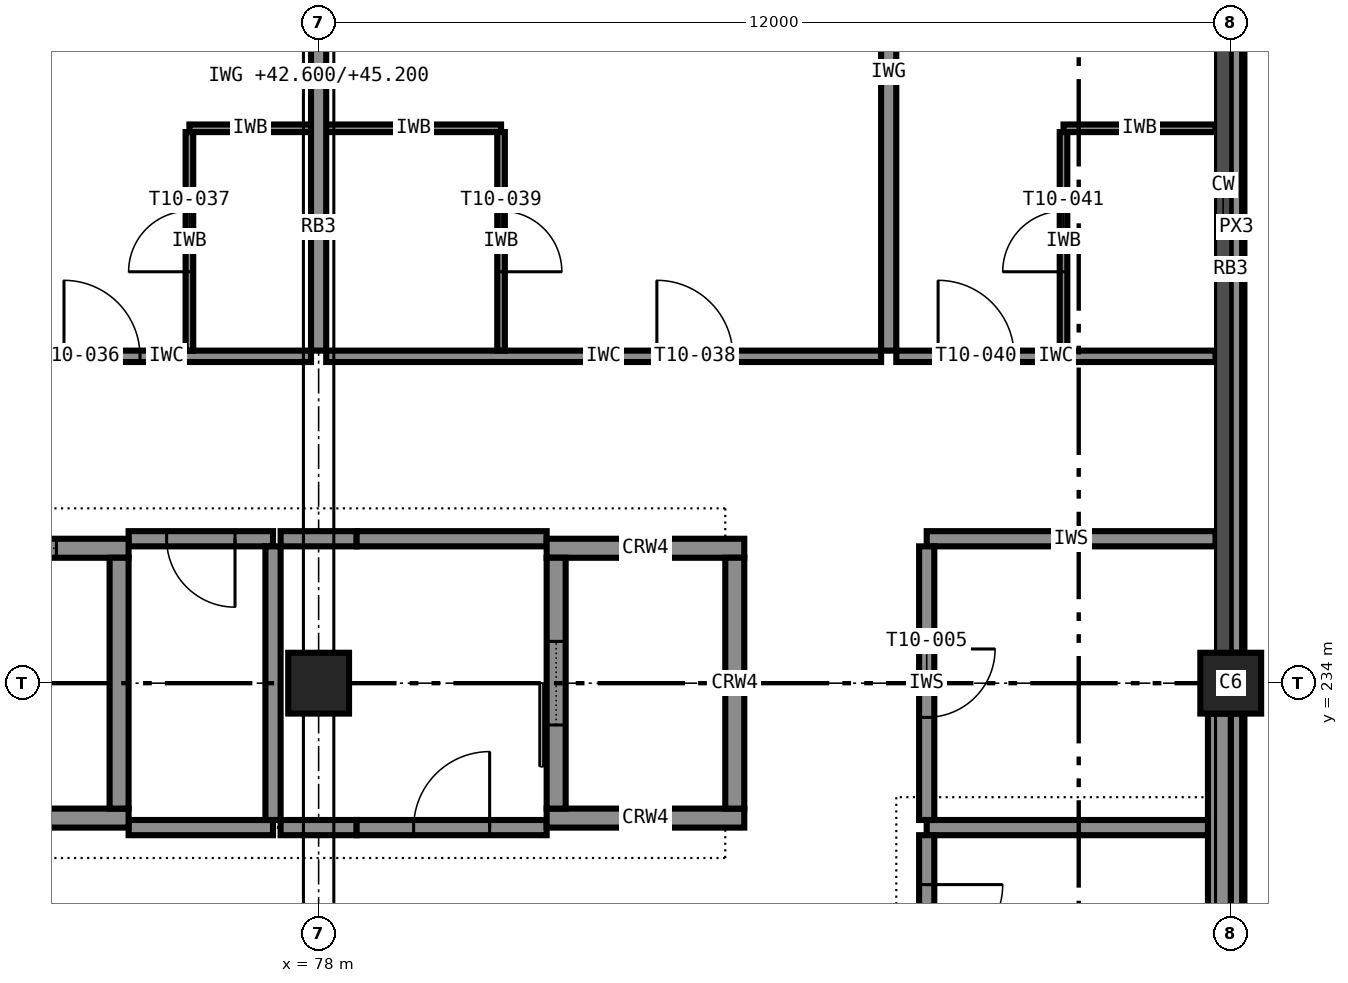
"""IFC4 building model, lengths in metres.
Left out: names, types, materials, properties, quantities, classifications, styles, units other than length and angle.
Written with IfcOpenShell. Run it as: python <this file> out.ifc"""

import sys

from ifc_helpers import new_model, si_unit, direction, frame, frame_2d, origin, origin_2d, place, context, subcontext, project, spatial, rectangle, extrude, element, fill, save


model = new_model("IFC4")
c1 = context("Model", 3, precision=1e-05, world=origin(), true_north=direction((0.0, 1.0)))
c2 = subcontext(c1, "Body", "Model", "MODEL_VIEW")
j1 = project(units=[si_unit("LENGTHUNIT", "METRE"), si_unit("PLANEANGLEUNIT", "RADIAN")], contexts=[c1])
p1 = place(None, origin())
s1 = spatial("IfcSite", under=j1, at=p1, CompositionType="ELEMENT")
p2 = place(p1, origin())
s2 = spatial("IfcBuilding", under=s1, at=p2, CompositionType="ELEMENT")
p3 = place(p2, frame((0.0, 0.0, 42.6)))
s3 = spatial("IfcBuildingStorey", under=s2, at=p3, CompositionType="ELEMENT", Elevation=42.6)
for number, where, z_axis, x_axis in (
    (1, (78.0, 234.0, 0.0), (0.0, 0.0, 1.0), (1.0, 0.0, 0.0)),
    (2, (90.0, 234.0, 0.0), (0.0, 0.0, 1.0), (1.0, 0.0, 0.0)),
):
    element("IfcColumn", number, at=place(p3, frame(where, z_axis=z_axis, x_axis=x_axis)), inside=s3, PredefinedType="COLUMN", context=c2, shape_type="SweptSolid", body=[
        extrude(rectangle(XDim=0.8, YDim=0.8, at=origin_2d()), origin(), (0.0, 0.0, 1.0), 3.6),
    ])
p4 = place(p3, frame((72.5, 232.225, 0.0), z_axis=(0.0, 0.0, 1.0), x_axis=(1.0, 0.0, 0.0)))
e3 = element("IfcWall", 3, at=p4, inside=s3, PredefinedType="SHEAR", context=c2, shape_type="SweptSolid", body=[
    extrude(rectangle(XDim=3.0, YDim=0.25, at=frame_2d((1.5, 0.0))), origin(), (0.0, 0.0, 1.0), 3.6),
])
p5 = place(p3, frame((72.5, 235.775, 0.0), z_axis=(0.0, 0.0, 1.0), x_axis=(1.0, 0.0, 0.0)))
e4 = element("IfcWall", 4, at=p5, inside=s3, PredefinedType="SHEAR", context=c2, shape_type="SweptSolid", body=[
    extrude(rectangle(XDim=3.0, YDim=0.25, at=frame_2d((1.5, 0.0))), origin(), (0.0, 0.0, 1.0), 3.6),
])
p6 = place(p5, frame((0.95, 0.0, 0.0)))
e5 = element("IfcOpeningElement", 5, at=p6, cuts=e4, PredefinedType="OPENING", context=c2, shape_type="SweptSolid", body=[
    extrude(rectangle(XDim=1.1, YDim=2.1, at=frame_2d((0.55, 1.05))), frame((0.0, 0.135, 0.0), z_axis=(0.0, -1.0, 0.0), x_axis=(1.0, 0.0, 0.0)), (0.0, 0.0, 1.0), 0.27),
])
p7 = place(p3, frame((75.375, 232.35, 0.0), z_axis=(0.0, 0.0, 1.0), x_axis=(0.0, 1.0, 0.0)))
e6 = element("IfcWall", 6, at=p7, inside=s3, PredefinedType="SHEAR", context=c2, shape_type="SweptSolid", body=[
    extrude(rectangle(XDim=3.3, YDim=0.25, at=frame_2d((1.65, 0.0))), origin(), (0.0, 0.0, 1.0), 3.6),
])
for number, where, z_axis, x_axis in (
    (7, (81.0, 232.225, 0.0), (0.0, 0.0, 1.0), (1.0, 0.0, 0.0)),
    (8, (81.0, 235.775, 0.0), (0.0, 0.0, 1.0), (1.0, 0.0, 0.0)),
):
    element("IfcWall", number, at=place(p3, frame(where, z_axis=z_axis, x_axis=x_axis)), inside=s3, PredefinedType="SHEAR", context=c2, shape_type="SweptSolid", body=[
        extrude(rectangle(XDim=2.6, YDim=0.25, at=frame_2d((1.3, 0.0))), origin(), (0.0, 0.0, 1.0), 3.6),
    ])
p8 = place(p3, frame((81.125, 232.35, 0.0), z_axis=(0.0, 0.0, 1.0), x_axis=(0.0, 1.0, 0.0)))
e9 = element("IfcWall", 9, at=p8, inside=s3, PredefinedType="SHEAR", context=c2, shape_type="SweptSolid", body=[
    extrude(rectangle(XDim=3.3, YDim=0.25, at=frame_2d((1.65, 0.0))), origin(), (0.0, 0.0, 1.0), 3.6),
])
p9 = place(p8, frame((1.1, 0.0, 0.0)))
e10 = element("IfcOpeningElement", 10, at=p9, cuts=e9, PredefinedType="OPENING", context=c2, shape_type="SweptSolid", body=[
    extrude(rectangle(XDim=1.1, YDim=2.1, at=frame_2d((0.55, 1.05))), frame((0.0, 0.135, 0.0), z_axis=(0.0, -1.0, 0.0), x_axis=(1.0, 0.0, 0.0)), (0.0, 0.0, 1.0), 0.27),
])
p10 = place(p3, frame((83.475, 232.35, 0.0), z_axis=(0.0, 0.0, 1.0), x_axis=(0.0, 1.0, 0.0)))
e11 = element("IfcWall", 11, at=p10, inside=s3, PredefinedType="SHEAR", context=c2, shape_type="SweptSolid", body=[
    extrude(rectangle(XDim=3.3, YDim=0.25, at=frame_2d((1.65, 0.0))), origin(), (0.0, 0.0, 1.0), 3.6),
])
p11 = place(p3, frame((89.85, 222.4, 0.0), z_axis=(0.0, 0.0, 1.0), x_axis=(0.0, 1.0, 0.0)))
e12 = element("IfcWall", 12, at=p11, inside=s3, PredefinedType="STANDARD", context=c2, shape_type="SweptSolid", body=[
    extrude(rectangle(XDim=11.2, YDim=0.3, at=frame_2d((5.6, 0.0))), origin(), (0.0, 0.0, 1.0), 2.6),
])
for number, where, z_axis, x_axis in (
    (13, (90.075, 222.4, 3.4), (0.0, 0.0, 1.0), (0.0, 1.0, 0.0)),
    (14, (90.075, 234.4, 3.4), (0.0, 0.0, 1.0), (0.0, 1.0, 0.0)),
):
    element("IfcWall", number, at=place(p3, frame(where, z_axis=z_axis, x_axis=x_axis)), inside=s3, PredefinedType="STANDARD", context=c2, shape_type="SweptSolid", body=[
        extrude(rectangle(XDim=11.2, YDim=0.15, at=frame_2d((5.6, 0.0))), origin(), (0.0, 0.0, 1.0), 0.2),
    ])
p12 = place(p3, frame((75.5, 232.1, 0.0), z_axis=(0.0, 0.0, 1.0), x_axis=(1.0, 0.0, 0.0)))
e15 = element("IfcWall", 15, at=p12, inside=s3, PredefinedType="PARTITIONING", context=c2, shape_type="SweptSolid", body=[
    extrude(rectangle(XDim=1.9, YDim=0.2, at=frame_2d((0.95, 0.0))), origin(), (0.0, 0.0, 1.0), 3.4),
])
p13 = place(p3, frame((77.5, 232.1, 0.0), z_axis=(0.0, 0.0, 1.0), x_axis=(1.0, 0.0, 0.0)))
e16 = element("IfcWall", 16, at=p13, inside=s3, PredefinedType="PARTITIONING", context=c2, shape_type="SweptSolid", body=[
    extrude(rectangle(XDim=1.0, YDim=0.2, at=frame_2d((0.5, 0.0))), origin(), (0.0, 0.0, 1.0), 3.4),
])
p14 = place(p3, frame((78.5, 232.1, 0.0), z_axis=(0.0, 0.0, 1.0), x_axis=(1.0, 0.0, 0.0)))
e17 = element("IfcWall", 17, at=p14, inside=s3, PredefinedType="PARTITIONING", context=c2, shape_type="SweptSolid", body=[
    extrude(rectangle(XDim=2.5, YDim=0.2, at=frame_2d((1.25, 0.0))), origin(), (0.0, 0.0, 1.0), 3.4),
])
p15 = place(p14, frame((0.75, 0.0, 0.0)))
e18 = element("IfcOpeningElement", 18, at=p15, cuts=e17, PredefinedType="OPENING", context=c2, shape_type="SweptSolid", body=[
    extrude(rectangle(XDim=1.0, YDim=2.1, at=frame_2d((0.5, 1.05))), frame((0.0, 0.11, 0.0), z_axis=(0.0, -1.0, 0.0), x_axis=(1.0, 0.0, 0.0)), (0.0, 0.0, 1.0), 0.22),
])
p16 = place(p3, frame((86.0, 232.1, 0.0), z_axis=(0.0, 0.0, 1.0), x_axis=(1.0, 0.0, 0.0)))
e19 = element("IfcWall", 19, at=p16, inside=s3, PredefinedType="PARTITIONING", context=c2, shape_type="SweptSolid", body=[
    extrude(rectangle(XDim=3.7, YDim=0.2, at=frame_2d((1.85, 0.0))), origin(), (0.0, 0.0, 1.0), 3.4),
])
p17 = place(p3, frame((77.4, 235.9, 0.0), z_axis=(0.0, 0.0, 1.0), x_axis=(-1.0, 0.0, 0.0)))
e20 = element("IfcWall", 20, at=p17, inside=s3, PredefinedType="PARTITIONING", context=c2, shape_type="SweptSolid", body=[
    extrude(rectangle(XDim=1.9, YDim=0.2, at=frame_2d((0.95, 0.0))), origin(), (0.0, 0.0, 1.0), 3.4),
])
p18 = place(p17, frame((0.5, 0.0, 0.0)))
e21 = element("IfcOpeningElement", 21, at=p18, cuts=e20, PredefinedType="OPENING", context=c2, shape_type="SweptSolid", body=[
    extrude(rectangle(XDim=0.9, YDim=2.1, at=frame_2d((0.45, 1.05))), frame((0.0, 0.11, 0.0), z_axis=(0.0, -1.0, 0.0), x_axis=(1.0, 0.0, 0.0)), (0.0, 0.0, 1.0), 0.22),
])
p19 = place(p3, frame((77.5, 235.9, 0.0), z_axis=(0.0, 0.0, 1.0), x_axis=(1.0, 0.0, 0.0)))
e22 = element("IfcWall", 22, at=p19, inside=s3, PredefinedType="PARTITIONING", context=c2, shape_type="SweptSolid", body=[
    extrude(rectangle(XDim=1.0, YDim=0.2, at=frame_2d((0.5, 0.0))), origin(), (0.0, 0.0, 1.0), 3.4),
])
p20 = place(p3, frame((78.5, 235.9, 0.0), z_axis=(0.0, 0.0, 1.0), x_axis=(1.0, 0.0, 0.0)))
e23 = element("IfcWall", 23, at=p20, inside=s3, PredefinedType="PARTITIONING", context=c2, shape_type="SweptSolid", body=[
    extrude(rectangle(XDim=2.5, YDim=0.2, at=frame_2d((1.25, 0.0))), origin(), (0.0, 0.0, 1.0), 3.4),
])
p21 = place(p3, frame((86.0, 235.9, 0.0), z_axis=(0.0, 0.0, 1.0), x_axis=(1.0, 0.0, 0.0)))
e24 = element("IfcWall", 24, at=p21, inside=s3, PredefinedType="PARTITIONING", context=c2, shape_type="SweptSolid", body=[
    extrude(rectangle(XDim=3.8, YDim=0.2, at=frame_2d((1.9, 0.0))), origin(), (0.0, 0.0, 1.0), 3.4),
])
p22 = place(p3, frame((77.4, 232.2, 0.0), z_axis=(0.0, 0.0, 1.0), x_axis=(0.0, 1.0, 0.0)))
e25 = element("IfcWall", 25, at=p22, inside=s3, PredefinedType="PARTITIONING", context=c2, shape_type="SweptSolid", body=[
    extrude(rectangle(XDim=3.6, YDim=0.2, at=frame_2d((1.8, 0.0))), origin(), (0.0, 0.0, 1.0), 3.4),
])
p23 = place(p3, frame((86.0, 235.8, 0.0), z_axis=(0.0, 0.0, 1.0), x_axis=(0.0, -1.0, 0.0)))
e26 = element("IfcWall", 26, at=p23, inside=s3, PredefinedType="PARTITIONING", context=c2, shape_type="SweptSolid", body=[
    extrude(rectangle(XDim=3.6, YDim=0.2, at=frame_2d((1.8, 0.0))), origin(), (0.0, 0.0, 1.0), 3.4),
])
p24 = place(p23, frame((1.35, 0.0, 0.0)))
e27 = element("IfcOpeningElement", 27, at=p24, cuts=e26, PredefinedType="OPENING", context=c2, shape_type="SweptSolid", body=[
    extrude(rectangle(XDim=0.9, YDim=2.1, at=frame_2d((0.45, 1.05))), frame((0.0, 0.11, 0.0), z_axis=(0.0, -1.0, 0.0), x_axis=(1.0, 0.0, 0.0)), (0.0, 0.0, 1.0), 0.22),
])
p25 = place(p3, frame((86.0, 232.0, 0.0), z_axis=(0.0, 0.0, 1.0), x_axis=(0.0, -1.0, 0.0)))
e28 = element("IfcWall", 28, at=p25, inside=s3, PredefinedType="PARTITIONING", context=c2, shape_type="SweptSolid", body=[
    extrude(rectangle(XDim=2.3, YDim=0.2, at=frame_2d((1.15, 0.0))), origin(), (0.0, 0.0, 1.0), 3.4),
])
p26 = place(p25, frame((0.65, 0.0, 0.0)))
e29 = element("IfcOpeningElement", 29, at=p26, cuts=e28, PredefinedType="OPENING", context=c2, shape_type="SweptSolid", body=[
    extrude(rectangle(XDim=1.0, YDim=2.1, at=frame_2d((0.5, 1.05))), frame((0.0, 0.11, 0.0), z_axis=(0.0, -1.0, 0.0), x_axis=(1.0, 0.0, 0.0)), (0.0, 0.0, 1.0), 0.22),
])
p27 = place(p3, frame((74.1, 238.3, 0.0), z_axis=(0.0, 0.0, 1.0), x_axis=(1.0, 0.0, 0.0)))
e30 = element("IfcWall", 30, at=p27, inside=s3, PredefinedType="PARTITIONING", context=c2, shape_type="SweptSolid", body=[
    extrude(rectangle(XDim=3.8, YDim=0.15, at=frame_2d((1.9, 0.0))), origin(), (0.0, 0.0, 1.0), 3.4),
])
p28 = place(p27, frame((0.55, 0.0, 0.0)))
e31 = element("IfcOpeningElement", 31, at=p28, cuts=e30, PredefinedType="OPENING", context=c2, shape_type="SweptSolid", body=[
    extrude(rectangle(XDim=1.0, YDim=2.1, at=frame_2d((0.5, 1.05))), frame((0.0, 0.085, 0.0), z_axis=(0.0, -1.0, 0.0), x_axis=(1.0, 0.0, 0.0)), (0.0, 0.0, 1.0), 0.17),
])
p29 = place(p3, frame((76.3, 241.3, 0.0), z_axis=(0.0, 0.0, 1.0), x_axis=(1.0, 0.0, 0.0)))
e32 = element("IfcWall", 32, at=p29, inside=s3, PredefinedType="PARTITIONING", context=c2, shape_type="SweptSolid", body=[
    extrude(rectangle(XDim=1.6, YDim=0.1, at=frame_2d((0.8, 0.0))), origin(), (0.0, 0.0, 1.0), 3.4),
])
p30 = place(p3, frame((76.3, 238.375, 0.0), z_axis=(0.0, 0.0, 1.0), x_axis=(0.0, 1.0, 0.0)))
e33 = element("IfcWall", 33, at=p30, inside=s3, PredefinedType="PARTITIONING", context=c2, shape_type="SweptSolid", body=[
    extrude(rectangle(XDim=2.875, YDim=0.1, at=frame_2d((1.438, 0.0))), origin(), (0.0, 0.0, 1.0), 3.4),
])
p31 = place(p30, frame((1.038, 0.0, 0.0)))
e34 = element("IfcOpeningElement", 34, at=p31, cuts=e33, PredefinedType="OPENING", context=c2, shape_type="SweptSolid", body=[
    extrude(rectangle(XDim=0.8, YDim=2.1, at=frame_2d((0.4, 1.05))), frame((0.0, 0.06, 0.0), z_axis=(0.0, -1.0, 0.0), x_axis=(1.0, 0.0, 0.0)), (0.0, 0.0, 1.0), 0.12),
])
p32 = place(p3, frame((78.1, 238.3, 0.0), z_axis=(0.0, 0.0, 1.0), x_axis=(1.0, 0.0, 0.0)))
e35 = element("IfcWall", 35, at=p32, inside=s3, PredefinedType="PARTITIONING", context=c2, shape_type="SweptSolid", body=[
    extrude(rectangle(XDim=7.3, YDim=0.15, at=frame_2d((3.65, 0.0))), origin(), (0.0, 0.0, 1.0), 3.4),
])
p33 = place(p32, frame((4.35, 0.0, 0.0)))
e36 = element("IfcOpeningElement", 36, at=p33, cuts=e35, PredefinedType="OPENING", context=c2, shape_type="SweptSolid", body=[
    extrude(rectangle(XDim=1.0, YDim=2.1, at=frame_2d((0.5, 1.05))), frame((0.0, 0.085, 0.0), z_axis=(0.0, -1.0, 0.0), x_axis=(1.0, 0.0, 0.0)), (0.0, 0.0, 1.0), 0.17),
])
p34 = place(p3, frame((78.1, 241.3, 0.0), z_axis=(0.0, 0.0, 1.0), x_axis=(1.0, 0.0, 0.0)))
e37 = element("IfcWall", 37, at=p34, inside=s3, PredefinedType="PARTITIONING", context=c2, shape_type="SweptSolid", body=[
    extrude(rectangle(XDim=2.3, YDim=0.1, at=frame_2d((1.15, 0.0))), origin(), (0.0, 0.0, 1.0), 3.4),
])
p35 = place(p3, frame((80.4, 241.25, 0.0), z_axis=(0.0, 0.0, 1.0), x_axis=(0.0, -1.0, 0.0)))
e38 = element("IfcWall", 38, at=p35, inside=s3, PredefinedType="PARTITIONING", context=c2, shape_type="SweptSolid", body=[
    extrude(rectangle(XDim=2.875, YDim=0.1, at=frame_2d((1.438, 0.0))), origin(), (0.0, 0.0, 1.0), 3.4),
])
p36 = place(p35, frame((1.038, 0.0, 0.0)))
e39 = element("IfcOpeningElement", 39, at=p36, cuts=e38, PredefinedType="OPENING", context=c2, shape_type="SweptSolid", body=[
    extrude(rectangle(XDim=0.8, YDim=2.1, at=frame_2d((0.4, 1.05))), frame((0.0, 0.06, 0.0), z_axis=(0.0, -1.0, 0.0), x_axis=(1.0, 0.0, 0.0)), (0.0, 0.0, 1.0), 0.12),
])
p37 = place(p3, frame((85.6, 238.3, 0.0), z_axis=(0.0, 0.0, 1.0), x_axis=(1.0, 0.0, 0.0)))
e40 = element("IfcWall", 40, at=p37, inside=s3, PredefinedType="PARTITIONING", context=c2, shape_type="SweptSolid", body=[
    extrude(rectangle(XDim=4.2, YDim=0.15, at=frame_2d((2.1, 0.0))), origin(), (0.0, 0.0, 1.0), 3.4),
])
p38 = place(p37, frame((0.55, 0.0, 0.0)))
e41 = element("IfcOpeningElement", 41, at=p38, cuts=e40, PredefinedType="OPENING", context=c2, shape_type="SweptSolid", body=[
    extrude(rectangle(XDim=1.0, YDim=2.1, at=frame_2d((0.5, 1.05))), frame((0.0, 0.085, 0.0), z_axis=(0.0, -1.0, 0.0), x_axis=(1.0, 0.0, 0.0)), (0.0, 0.0, 1.0), 0.17),
])
p39 = place(p3, frame((87.8, 241.3, 0.0), z_axis=(0.0, 0.0, 1.0), x_axis=(1.0, 0.0, 0.0)))
e42 = element("IfcWall", 42, at=p39, inside=s3, PredefinedType="PARTITIONING", context=c2, shape_type="SweptSolid", body=[
    extrude(rectangle(XDim=2.0, YDim=0.1, at=frame_2d((1.0, 0.0))), origin(), (0.0, 0.0, 1.0), 3.4),
])
p40 = place(p3, frame((87.8, 238.375, 0.0), z_axis=(0.0, 0.0, 1.0), x_axis=(0.0, 1.0, 0.0)))
e43 = element("IfcWall", 43, at=p40, inside=s3, PredefinedType="PARTITIONING", context=c2, shape_type="SweptSolid", body=[
    extrude(rectangle(XDim=2.875, YDim=0.1, at=frame_2d((1.438, 0.0))), origin(), (0.0, 0.0, 1.0), 3.4),
])
p41 = place(p40, frame((1.038, 0.0, 0.0)))
e44 = element("IfcOpeningElement", 44, at=p41, cuts=e43, PredefinedType="OPENING", context=c2, shape_type="SweptSolid", body=[
    extrude(rectangle(XDim=0.8, YDim=2.1, at=frame_2d((0.4, 1.05))), frame((0.0, 0.06, 0.0), z_axis=(0.0, -1.0, 0.0), x_axis=(1.0, 0.0, 0.0)), (0.0, 0.0, 1.0), 0.12),
])
p42 = place(p3, frame((78.0, 245.6, 0.0), z_axis=(0.0, 0.0, 1.0), x_axis=(0.0, -1.0, 0.0)))
e45 = element("IfcWall", 45, at=p42, inside=s3, PredefinedType="PARTITIONING", context=c2, shape_type="SweptSolid", body=[
    extrude(rectangle(XDim=7.225, YDim=0.2, at=frame_2d((3.613, 0.0))), origin(), (0.0, 0.0, 1.0), 2.6),
])
p43 = place(p3, frame((85.5, 245.7, 0.0), z_axis=(0.0, 0.0, 1.0), x_axis=(0.0, -1.0, 0.0)))
e46 = element("IfcWall", 46, at=p43, inside=s3, PredefinedType="PARTITIONING", context=c2, shape_type="SweptSolid", body=[
    extrude(rectangle(XDim=7.325, YDim=0.2, at=frame_2d((3.663, 0.0))), origin(), (0.0, 0.0, 1.0), 3.4),
])
p44 = place(p18, origin())
e47 = element("IfcDoor", 47, at=p44, inside=s3, OperationType="SINGLE_SWING_LEFT", PredefinedType="DOOR", context=c2, shape_type="SweptSolid", body=[
    extrude(rectangle(XDim=0.9, YDim=2.1, at=frame_2d((0.45, 1.05))), frame((0.0, 0.025, 0.0), z_axis=(0.0, -1.0, 0.0), x_axis=(1.0, 0.0, 0.0)), (0.0, 0.0, 1.0), 0.05),
])
fill(e21, e47)
p45 = place(p15, origin())
e48 = element("IfcDoor", 48, at=p45, inside=s3, OperationType="SINGLE_SWING_RIGHT", PredefinedType="DOOR", context=c2, shape_type="SweptSolid", body=[
    extrude(rectangle(XDim=1.0, YDim=2.1, at=frame_2d((0.5, 1.05))), frame((0.0, 0.025, 0.0), z_axis=(0.0, -1.0, 0.0), x_axis=(1.0, 0.0, 0.0)), (0.0, 0.0, 1.0), 0.05),
])
fill(e18, e48)
p46 = place(p24, origin())
e49 = element("IfcDoor", 49, at=p46, inside=s3, OperationType="SINGLE_SWING_LEFT", PredefinedType="DOOR", context=c2, shape_type="SweptSolid", body=[
    extrude(rectangle(XDim=0.9, YDim=2.1, at=frame_2d((0.45, 1.05))), frame((0.0, 0.025, 0.0), z_axis=(0.0, -1.0, 0.0), x_axis=(1.0, 0.0, 0.0)), (0.0, 0.0, 1.0), 0.05),
])
fill(e27, e49)
p47 = place(p26, origin())
e50 = element("IfcDoor", 50, at=p47, inside=s3, OperationType="SINGLE_SWING_LEFT", PredefinedType="DOOR", context=c2, shape_type="SweptSolid", body=[
    extrude(rectangle(XDim=1.0, YDim=2.1, at=frame_2d((0.5, 1.05))), frame((0.0, 0.025, 0.0), z_axis=(0.0, -1.0, 0.0), x_axis=(1.0, 0.0, 0.0)), (0.0, 0.0, 1.0), 0.05),
])
fill(e29, e50)
p48 = place(p28, origin())
e51 = element("IfcDoor", 51, at=p48, inside=s3, OperationType="SINGLE_SWING_LEFT", PredefinedType="DOOR", context=c2, shape_type="SweptSolid", body=[
    extrude(rectangle(XDim=1.0, YDim=2.1, at=frame_2d((0.5, 1.05))), frame((0.0, 0.025, 0.0), z_axis=(0.0, -1.0, 0.0), x_axis=(1.0, 0.0, 0.0)), (0.0, 0.0, 1.0), 0.05),
])
fill(e31, e51)
p49 = place(p31, origin())
e52 = element("IfcDoor", 52, at=p49, inside=s3, OperationType="SINGLE_SWING_LEFT", PredefinedType="DOOR", context=c2, shape_type="SweptSolid", body=[
    extrude(rectangle(XDim=0.8, YDim=2.1, at=frame_2d((0.4, 1.05))), frame((0.0, 0.025, 0.0), z_axis=(0.0, -1.0, 0.0), x_axis=(1.0, 0.0, 0.0)), (0.0, 0.0, 1.0), 0.05),
])
fill(e34, e52)
p50 = place(p33, origin())
e53 = element("IfcDoor", 53, at=p50, inside=s3, OperationType="SINGLE_SWING_LEFT", PredefinedType="DOOR", context=c2, shape_type="SweptSolid", body=[
    extrude(rectangle(XDim=1.0, YDim=2.1, at=frame_2d((0.5, 1.05))), frame((0.0, 0.025, 0.0), z_axis=(0.0, -1.0, 0.0), x_axis=(1.0, 0.0, 0.0)), (0.0, 0.0, 1.0), 0.05),
])
fill(e36, e53)
p51 = place(p36, origin())
e54 = element("IfcDoor", 54, at=p51, inside=s3, OperationType="SINGLE_SWING_RIGHT", PredefinedType="DOOR", context=c2, shape_type="SweptSolid", body=[
    extrude(rectangle(XDim=0.8, YDim=2.1, at=frame_2d((0.4, 1.05))), frame((0.0, 0.025, 0.0), z_axis=(0.0, -1.0, 0.0), x_axis=(1.0, 0.0, 0.0)), (0.0, 0.0, 1.0), 0.05),
])
fill(e39, e54)
p52 = place(p38, origin())
e55 = element("IfcDoor", 55, at=p52, inside=s3, OperationType="SINGLE_SWING_LEFT", PredefinedType="DOOR", context=c2, shape_type="SweptSolid", body=[
    extrude(rectangle(XDim=1.0, YDim=2.1, at=frame_2d((0.5, 1.05))), frame((0.0, 0.025, 0.0), z_axis=(0.0, -1.0, 0.0), x_axis=(1.0, 0.0, 0.0)), (0.0, 0.0, 1.0), 0.05),
])
fill(e41, e55)
p53 = place(p41, origin())
e56 = element("IfcDoor", 56, at=p53, inside=s3, OperationType="SINGLE_SWING_LEFT", PredefinedType="DOOR", context=c2, shape_type="SweptSolid", body=[
    extrude(rectangle(XDim=0.8, YDim=2.1, at=frame_2d((0.4, 1.05))), frame((0.0, 0.025, 0.0), z_axis=(0.0, -1.0, 0.0), x_axis=(1.0, 0.0, 0.0)), (0.0, 0.0, 1.0), 0.05),
])
fill(e44, e56)
p54 = place(p6, origin())
e57 = element("IfcDoor", 57, at=p54, inside=s3, OperationType="SLIDING_TO_LEFT", PredefinedType="DOOR", context=c2, shape_type="SweptSolid", body=[
    extrude(rectangle(XDim=1.1, YDim=2.1, at=frame_2d((0.55, 1.05))), frame((0.0, 0.025, 0.0), z_axis=(0.0, -1.0, 0.0), x_axis=(1.0, 0.0, 0.0)), (0.0, 0.0, 1.0), 0.05),
])
fill(e5, e57)
p55 = place(p9, origin())
e58 = element("IfcDoor", 58, at=p55, inside=s3, OperationType="SLIDING_TO_LEFT", PredefinedType="DOOR", context=c2, shape_type="SweptSolid", body=[
    extrude(rectangle(XDim=1.1, YDim=2.1, at=frame_2d((0.55, 1.05))), frame((0.0, 0.025, 0.0), z_axis=(0.0, -1.0, 0.0), x_axis=(1.0, 0.0, 0.0)), (0.0, 0.0, 1.0), 0.05),
])
fill(e10, e58)
save(model, sys.argv[1])
